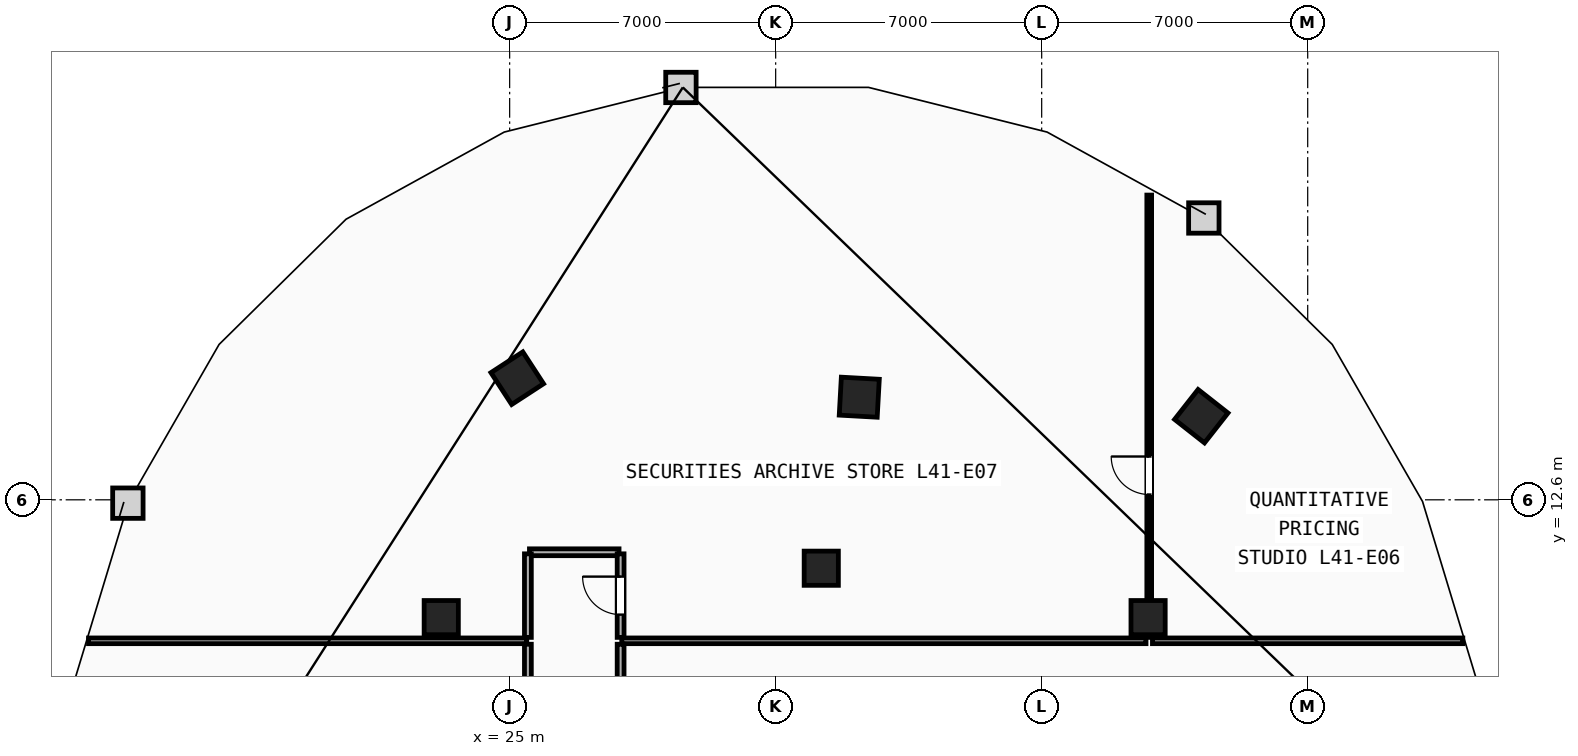
"""IFC4 building model, lengths in metres.
Left out: names, types, materials, properties, quantities, classifications, styles, units other than length and angle.
Written with IfcOpenShell. Run it as: python <this file> out.ifc"""

import sys

from ifc_helpers import new_model, si_unit, direction, frame, frame_2d, origin, origin_2d, place, context, subcontext, project, spatial, rectangle, extrude, element, fill, save


model = new_model("IFC4")
c1 = context("Model", 3, precision=1e-05, world=origin(), true_north=direction((0.0, 1.0)))
c2 = subcontext(c1, "Body", "Model", "MODEL_VIEW")
j1 = project(units=[si_unit("LENGTHUNIT", "METRE"), si_unit("PLANEANGLEUNIT", "RADIAN")], contexts=[c1])
p1 = place(None, origin())
s1 = spatial("IfcSite", under=j1, at=p1, CompositionType="ELEMENT")
p2 = place(p1, origin())
s2 = spatial("IfcBuilding", under=s1, at=p2, CompositionType="ELEMENT")
p3 = place(p2, frame((0.0, 0.0, 158.4)))
s3 = spatial("IfcBuildingStorey", under=s2, at=p3, CompositionType="ELEMENT", Elevation=158.4)
for number, where, z_axis, x_axis in (
    (1, (41.8, 9.5, 0.0), (0.0, 0.0, 1.0), (1.0, 0.0, 0.0)),
    (2, (33.2, 10.8, 0.0), (0.0, 0.0, 1.0), (1.0, 0.0, 0.0)),
    (3, (23.2, 9.5, 0.0), (0.0, 0.0, 1.0), (1.0, 0.0, 0.0)),
):
    element("IfcColumn", number, at=place(p3, frame(where, z_axis=z_axis, x_axis=x_axis)), inside=s3, PredefinedType="COLUMN", context=c2, shape_type="SweptSolid", body=[
        extrude(rectangle(XDim=0.9, YDim=0.9, at=origin_2d()), origin(), (0.0, 0.0, 1.0), 3.6),
    ])
for number, where, z_axis, x_axis in (
    (4, (43.2, 14.8, 0.0), (0.0, 0.0, 1.0), (-0.786, 0.618, 0.0)),
    (5, (34.2, 15.3, 0.0), (0.0, 0.0, 1.0), (-0.998, 0.055, 0.0)),
    (6, (25.2, 15.8, 0.0), (0.0, 0.0, 1.0), (-0.838, -0.546, 0.0)),
):
    element("IfcColumn", number, at=place(p3, frame(where, z_axis=z_axis, x_axis=x_axis)), inside=s3, PredefinedType="COLUMN", context=c2, shape_type="SweptSolid", body=[
        extrude(rectangle(XDim=1.0, YDim=1.0, at=origin_2d()), origin(), (0.0, 0.0, 1.0), 3.6),
    ])
p4 = place(p3, frame((13.918, 8.89, 0.0), z_axis=(0.0, 0.0, 1.0), x_axis=(1.0, 0.0, 0.0)))
e7 = element("IfcWall", 7, at=p4, inside=s3, PredefinedType="PARTITIONING", context=c2, shape_type="SweptSolid", body=[
    extrude(rectangle(XDim=11.532, YDim=0.15, at=frame_2d((5.766, 0.0))), origin(), (0.0, 0.0, 1.0), 3.36),
])
p5 = place(p3, frame((27.95, 8.89, 0.0), z_axis=(0.0, 0.0, 1.0), x_axis=(1.0, 0.0, 0.0)))
e8 = element("IfcWall", 8, at=p5, inside=s3, PredefinedType="PARTITIONING", context=c2, shape_type="SweptSolid", body=[
    extrude(rectangle(XDim=13.795, YDim=0.15, at=frame_2d((6.897, 0.0))), origin(), (0.0, 0.0, 1.0), 3.36),
])
p6 = place(p3, frame((41.915, 8.89, 0.0), z_axis=(0.0, 0.0, 1.0), x_axis=(1.0, 0.0, 0.0)))
e9 = element("IfcWall", 9, at=p6, inside=s3, PredefinedType="PARTITIONING", context=c2, shape_type="SweptSolid", body=[
    extrude(rectangle(XDim=8.167, YDim=0.15, at=frame_2d((4.083, 0.0))), origin(), (0.0, 0.0, 1.0), 3.36),
])
p7 = place(p3, frame((25.48, 8.8, 0.0), z_axis=(0.0, 0.0, 1.0), x_axis=(0.0, -1.0, 0.0)))
e10 = element("IfcWall", 10, at=p7, inside=s3, PredefinedType="PARTITIONING", context=c2, shape_type="SweptSolid", body=[
    extrude(rectangle(XDim=8.35, YDim=0.18, at=frame_2d((4.175, 0.0))), origin(), (0.0, 0.0, 1.0), 3.36),
])
p8 = place(p3, frame((27.92, 0.45, 0.0), z_axis=(0.0, 0.0, 1.0), x_axis=(0.0, 1.0, 0.0)))
e11 = element("IfcWall", 11, at=p8, inside=s3, PredefinedType="PARTITIONING", context=c2, shape_type="SweptSolid", body=[
    extrude(rectangle(XDim=8.35, YDim=0.18, at=frame_2d((4.175, 0.0))), origin(), (0.0, 0.0, 1.0), 3.36),
])
p9 = place(p8, frame((3.675, 0.0, 0.0)))
e12 = element("IfcOpeningElement", 12, at=p9, cuts=e11, PredefinedType="OPENING", context=c2, shape_type="SweptSolid", body=[
    extrude(rectangle(XDim=1.0, YDim=2.15, at=frame_2d((0.5, 1.075))), frame((0.0, 0.1, 0.0), z_axis=(0.0, -1.0, 0.0), x_axis=(1.0, 0.0, 0.0)), (0.0, 0.0, 1.0), 0.2),
])
p10 = place(p3, frame((27.878, 11.22, 0.0), z_axis=(0.0, 0.0, 1.0), x_axis=(-1.0, 0.0, 0.0)))
e13 = element("IfcWall", 13, at=p10, inside=s3, PredefinedType="PARTITIONING", context=c2, shape_type="SweptSolid", body=[
    extrude(rectangle(XDim=2.357, YDim=0.18, at=frame_2d((1.178, 0.0))), origin(), (0.0, 0.0, 1.0), 3.36),
])
p11 = place(p3, frame((25.48, 11.178, 0.0), z_axis=(0.0, 0.0, 1.0), x_axis=(0.0, -1.0, 0.0)))
e14 = element("IfcWall", 14, at=p11, inside=s3, PredefinedType="PARTITIONING", context=c2, shape_type="SweptSolid", body=[
    extrude(rectangle(XDim=2.198, YDim=0.18, at=frame_2d((1.099, 0.0))), origin(), (0.0, 0.0, 1.0), 3.36),
])
p12 = place(p3, frame((27.92, 8.98, 0.0), z_axis=(0.0, 0.0, 1.0), x_axis=(0.0, 1.0, 0.0)))
e15 = element("IfcWall", 15, at=p12, inside=s3, PredefinedType="PARTITIONING", context=c2, shape_type="SweptSolid", body=[
    extrude(rectangle(XDim=2.198, YDim=0.18, at=frame_2d((1.099, 0.0))), origin(), (0.0, 0.0, 1.0), 3.36),
])
p13 = place(p12, frame((0.599, 0.0, 0.0)))
e16 = element("IfcOpeningElement", 16, at=p13, cuts=e15, PredefinedType="OPENING", context=c2, shape_type="SweptSolid", body=[
    extrude(rectangle(XDim=1.0, YDim=2.15, at=frame_2d((0.5, 1.075))), frame((0.0, 0.1, 0.0), z_axis=(0.0, -1.0, 0.0), x_axis=(1.0, 0.0, 0.0)), (0.0, 0.0, 1.0), 0.2),
])
p14 = place(p3, frame((41.83, 8.98, 0.0), z_axis=(0.0, 0.0, 1.0), x_axis=(0.0, 1.0, 0.0)))
e17 = element("IfcWall", 17, at=p14, inside=s3, PredefinedType="PARTITIONING", context=c2, shape_type="SweptSolid", body=[
    extrude(rectangle(XDim=11.638, YDim=0.125, at=frame_2d((5.819, 0.0))), origin(), (0.0, 0.0, 1.0), 2.897),
])
p15 = place(p14, frame((3.76, 0.0, 0.0)))
e18 = element("IfcOpeningElement", 18, at=p15, cuts=e17, PredefinedType="OPENING", context=c2, shape_type="SweptSolid", body=[
    extrude(rectangle(XDim=1.0, YDim=2.15, at=frame_2d((0.5, 1.075))), frame((0.0, 0.073, 0.0), z_axis=(0.0, -1.0, 0.0), x_axis=(1.0, 0.0, 0.0)), (0.0, 0.0, 1.0), 0.145),
])
p16 = place(p15, origin())
e19 = element("IfcDoor", 19, at=p16, inside=s3, OperationType="SINGLE_SWING_RIGHT", PredefinedType="DOOR", context=c2, shape_type="SweptSolid", body=[
    extrude(rectangle(XDim=1.0, YDim=2.15, at=frame_2d((0.5, 1.075))), frame((0.0, 0.025, 0.0), z_axis=(0.0, -1.0, 0.0), x_axis=(1.0, 0.0, 0.0)), (0.0, 0.0, 1.0), 0.05),
])
fill(e18, e19)
p17 = place(p13, origin())
e20 = element("IfcDoor", 20, at=p17, inside=s3, OperationType="SINGLE_SWING_RIGHT", PredefinedType="DOOR", context=c2, shape_type="SweptSolid", body=[
    extrude(rectangle(XDim=1.0, YDim=2.15, at=frame_2d((0.5, 1.075))), frame((0.0, 0.025, 0.0), z_axis=(0.0, -1.0, 0.0), x_axis=(1.0, 0.0, 0.0)), (0.0, 0.0, 1.0), 0.05),
])
fill(e16, e20)
save(model, sys.argv[1])
